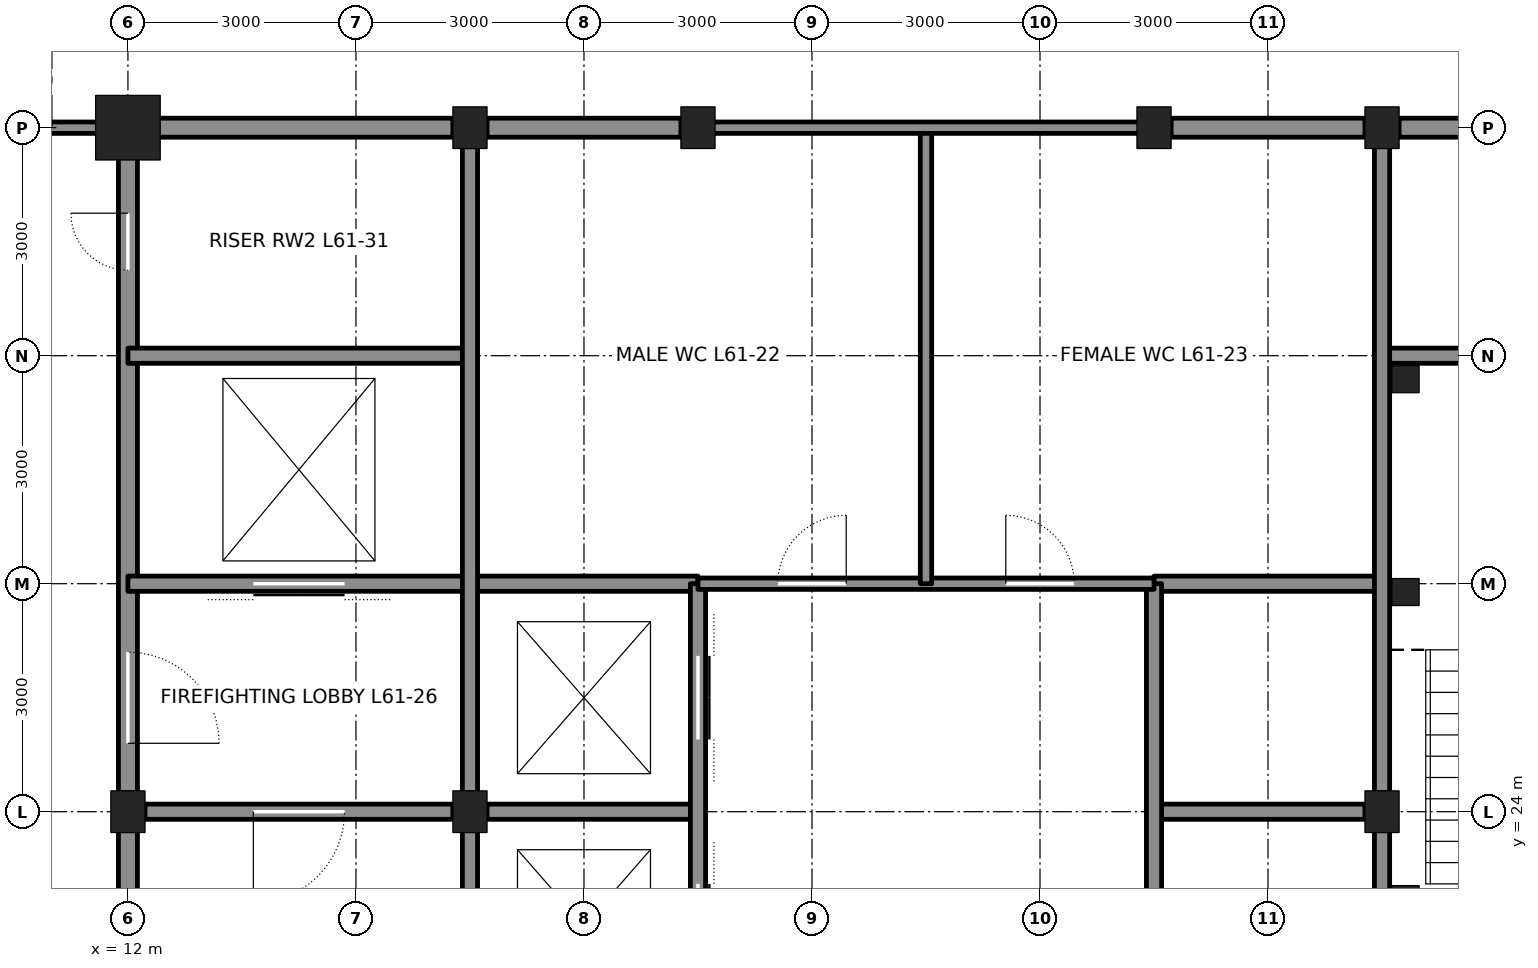
"""IFC4 building model, lengths in metres.
Left out: names, types, materials, properties, quantities, classifications, styles, units other than length and angle.
Written with IfcOpenShell. Run it as: python <this file> out.ifc"""

import sys

from ifc_helpers import new_model, si_unit, direction, frame, frame_2d, origin, origin_2d, place, context, subcontext, project, spatial, rectangle, hollow_rectangle, i_section, extrude, element, fill, save


model = new_model("IFC4")
c1 = context("Model", 3, precision=1e-05, world=origin(), true_north=direction((0.0, 1.0)))
c2 = subcontext(c1, "Body", "Model", "MODEL_VIEW")
j1 = project(units=[si_unit("LENGTHUNIT", "METRE"), si_unit("PLANEANGLEUNIT", "RADIAN")], contexts=[c1])
p1 = place(None, origin())
s1 = spatial("IfcSite", under=j1, at=p1, CompositionType="ELEMENT")
p2 = place(p1, origin())
s2 = spatial("IfcBuilding", under=s1, at=p2, CompositionType="ELEMENT")
p3 = place(p2, frame((0.0, 0.0, 274.8)))
s3 = spatial("IfcBuildingStorey", under=s2, at=p3, CompositionType="ELEMENT", Elevation=274.8)
p4 = place(p3, frame((12.0, 33.0, 0.0), z_axis=(0.0, 0.0, 1.0), x_axis=(1.0, 0.0, 0.0)))
e1 = element("IfcColumn", 1, at=p4, inside=s3, PredefinedType="COLUMN", context=c2, shape_type="SweptSolid", body=[
    extrude(hollow_rectangle(XDim=0.85, YDim=0.85, WallThickness=0.085, at=origin_2d()), origin(), (0.0, 0.0, 1.0), 4.2),
])
for number, where, z_axis, x_axis in (
    (2, (16.5, 33.0, 0.0), (0.0, 0.0, 1.0), (1.0, 0.0, 0.0)),
    (3, (19.5, 33.0, 0.0), (0.0, 0.0, 1.0), (1.0, 0.0, 0.0)),
    (4, (25.5, 33.0, 0.0), (0.0, 0.0, 1.0), (1.0, 0.0, 0.0)),
    (5, (28.5, 33.0, 0.0), (0.0, 0.0, 1.0), (1.0, 0.0, 0.0)),
    (6, (12.0, 24.0, 0.0), (0.0, 0.0, 1.0), (1.0, 0.0, 0.0)),
    (7, (16.5, 24.0, 0.0), (0.0, 0.0, 1.0), (1.0, 0.0, 0.0)),
    (8, (28.5, 24.0, 0.0), (0.0, 0.0, 1.0), (1.0, 0.0, 0.0)),
):
    element("IfcColumn", number, at=place(p3, frame(where, z_axis=z_axis, x_axis=x_axis)), inside=s3, PredefinedType="COLUMN", context=c2, shape_type="SweptSolid", body=[
        extrude(i_section(OverallWidth=0.449, OverallDepth=0.549, WebThickness=0.072, FlangeThickness=0.115, at=origin_2d()), origin(), (0.0, 0.0, 1.0), 4.2),
    ])
p5 = place(p3, frame((12.0, 21.25, 0.0), z_axis=(0.0, 0.0, 1.0), x_axis=(0.0, 1.0, 0.0)))
e9 = element("IfcWall", 9, at=p5, inside=s3, PredefinedType="SOLIDWALL", context=c2, shape_type="SweptSolid", body=[
    extrude(rectangle(XDim=2.5, YDim=0.25, at=frame_2d((1.25, 0.0))), origin(), (0.0, 0.0, 1.0), 3.113),
])
p6 = place(p3, frame((12.0, 24.25, 0.0), z_axis=(0.0, 0.0, 1.0), x_axis=(0.0, 1.0, 0.0)))
e10 = element("IfcWall", 10, at=p6, inside=s3, PredefinedType="SOLIDWALL", context=c2, shape_type="SweptSolid", body=[
    extrude(rectangle(XDim=8.5, YDim=0.25, at=frame_2d((4.25, 0.0))), origin(), (0.0, 0.0, 1.0), 3.113),
])
p7 = place(p6, frame((0.65, 0.0, 0.0)))
e11 = element("IfcOpeningElement", 11, at=p7, cuts=e10, PredefinedType="OPENING", context=c2, shape_type="SweptSolid", body=[
    extrude(rectangle(XDim=1.2, YDim=2.1, at=frame_2d((0.6, 1.05))), frame((0.0, 0.135, 0.0), z_axis=(0.0, -1.0, 0.0), x_axis=(1.0, 0.0, 0.0)), (0.0, 0.0, 1.0), 0.27),
])
p8 = place(p6, frame((6.875, 0.0, 0.0)))
e12 = element("IfcOpeningElement", 12, at=p8, cuts=e10, PredefinedType="OPENING", context=c2, shape_type="SweptSolid", body=[
    extrude(rectangle(XDim=0.75, YDim=2.1, at=frame_2d((0.375, 1.05))), frame((0.0, 0.135, 0.0), z_axis=(0.0, -1.0, 0.0), x_axis=(1.0, 0.0, 0.0)), (0.0, 0.0, 1.0), 0.27),
])
p9 = place(p3, frame((12.225, 24.0, 0.0), z_axis=(0.0, 0.0, 1.0), x_axis=(1.0, 0.0, 0.0)))
e13 = element("IfcWall", 13, at=p9, inside=s3, PredefinedType="SOLIDWALL", context=c2, shape_type="SweptSolid", body=[
    extrude(rectangle(XDim=4.05, YDim=0.2, at=frame_2d((2.025, 0.0))), origin(), (0.0, 0.0, 1.0), 3.09),
])
p10 = place(p9, frame((1.425, 0.0, 0.0)))
e14 = element("IfcOpeningElement", 14, at=p10, cuts=e13, PredefinedType="OPENING", context=c2, shape_type="SweptSolid", body=[
    extrude(rectangle(XDim=1.2, YDim=2.1, at=frame_2d((0.6, 1.05))), frame((0.0, 0.11, 0.0), z_axis=(0.0, -1.0, 0.0), x_axis=(1.0, 0.0, 0.0)), (0.0, 0.0, 1.0), 0.22),
])
for number, where, z_axis, x_axis in (
    (15, (16.725, 24.0, 0.0), (0.0, 0.0, 1.0), (1.0, 0.0, 0.0)),
    (16, (25.5, 24.0, 0.0), (0.0, 0.0, 1.0), (1.0, 0.0, 0.0)),
):
    element("IfcWall", number, at=place(p3, frame(where, z_axis=z_axis, x_axis=x_axis)), inside=s3, PredefinedType="SOLIDWALL", context=c2, shape_type="SweptSolid", body=[
        extrude(rectangle(XDim=2.775, YDim=0.2, at=frame_2d((1.388, 0.0))), origin(), (0.0, 0.0, 1.0), 3.09),
    ])
p11 = place(p3, frame((12.0, 27.0, 0.0), z_axis=(0.0, 0.0, 1.0), x_axis=(1.0, 0.0, 0.0)))
e17 = element("IfcWall", 17, at=p11, inside=s3, PredefinedType="SOLIDWALL", context=c2, shape_type="SweptSolid", body=[
    extrude(rectangle(XDim=7.5, YDim=0.2, at=frame_2d((3.75, 0.0))), origin(), (0.0, 0.0, 1.0), 4.04),
])
p12 = place(p11, frame((1.65, 0.0, 0.0)))
e18 = element("IfcOpeningElement", 18, at=p12, cuts=e17, PredefinedType="OPENING", context=c2, shape_type="SweptSolid", body=[
    extrude(rectangle(XDim=1.2, YDim=2.1, at=frame_2d((0.6, 1.05))), frame((0.0, 0.11, 0.0), z_axis=(0.0, -1.0, 0.0), x_axis=(1.0, 0.0, 0.0)), (0.0, 0.0, 1.0), 0.22),
])
p13 = place(p3, frame((25.5, 27.0, 0.0), z_axis=(0.0, 0.0, 1.0), x_axis=(1.0, 0.0, 0.0)))
e19 = element("IfcWall", 19, at=p13, inside=s3, PredefinedType="SOLIDWALL", context=c2, shape_type="SweptSolid", body=[
    extrude(rectangle(XDim=3.0, YDim=0.2, at=frame_2d((1.5, 0.0))), origin(), (0.0, 0.0, 1.0), 4.04),
])
for number, where, z_axis, x_axis in (
    (20, (12.0, 30.0, 0.0), (0.0, 0.0, 1.0), (1.0, 0.0, 0.0)),
    (21, (28.5, 30.0, 0.0), (0.0, 0.0, 1.0), (1.0, 0.0, 0.0)),
):
    element("IfcWall", number, at=place(p3, frame(where, z_axis=z_axis, x_axis=x_axis)), inside=s3, PredefinedType="SOLIDWALL", context=c2, shape_type="SweptSolid", body=[
        extrude(rectangle(XDim=4.5, YDim=0.2, at=frame_2d((2.25, 0.0))), origin(), (0.0, 0.0, 1.0), 4.04),
    ])
p14 = place(p3, frame((12.25, 33.0, 0.0), z_axis=(0.0, 0.0, 1.0), x_axis=(1.0, 0.0, 0.0)))
e22 = element("IfcWall", 22, at=p14, inside=s3, PredefinedType="SOLIDWALL", context=c2, shape_type="SweptSolid", body=[
    extrude(rectangle(XDim=4.025, YDim=0.25, at=frame_2d((2.013, 0.0))), origin(), (0.0, 0.0, 1.0), 3.181),
])
for number, where, z_axis, x_axis in (
    (23, (16.725, 33.0, 0.0), (0.0, 0.0, 1.0), (1.0, 0.0, 0.0)),
    (24, (25.725, 33.0, 0.0), (0.0, 0.0, 1.0), (1.0, 0.0, 0.0)),
):
    element("IfcWall", number, at=place(p3, frame(where, z_axis=z_axis, x_axis=x_axis)), inside=s3, PredefinedType="SOLIDWALL", context=c2, shape_type="SweptSolid", body=[
        extrude(rectangle(XDim=2.55, YDim=0.25, at=frame_2d((1.275, 0.0))), origin(), (0.0, 0.0, 1.0), 3.181),
    ])
p15 = place(p3, frame((28.725, 33.0, 0.0), z_axis=(0.0, 0.0, 1.0), x_axis=(1.0, 0.0, 0.0)))
e25 = element("IfcWall", 25, at=p15, inside=s3, PredefinedType="SOLIDWALL", context=c2, shape_type="SweptSolid", body=[
    extrude(rectangle(XDim=4.025, YDim=0.25, at=frame_2d((2.013, 0.0))), origin(), (0.0, 0.0, 1.0), 3.181),
])
p16 = place(p3, frame((16.5, 21.25, 0.0), z_axis=(0.0, 0.0, 1.0), x_axis=(0.0, 1.0, 0.0)))
e26 = element("IfcWall", 26, at=p16, inside=s3, PredefinedType="SOLIDWALL", context=c2, shape_type="SweptSolid", body=[
    extrude(rectangle(XDim=2.5, YDim=0.2, at=frame_2d((1.25, 0.0))), origin(), (0.0, 0.0, 1.0), 3.113),
])
p17 = place(p3, frame((16.5, 24.25, 0.0), z_axis=(0.0, 0.0, 1.0), x_axis=(0.0, 1.0, 0.0)))
e27 = element("IfcWall", 27, at=p17, inside=s3, PredefinedType="SOLIDWALL", context=c2, shape_type="SweptSolid", body=[
    extrude(rectangle(XDim=8.5, YDim=0.2, at=frame_2d((4.25, 0.0))), origin(), (0.0, 0.0, 1.0), 3.113),
])
p18 = place(p3, frame((19.5, 15.0, 0.0), z_axis=(0.0, 0.0, 1.0), x_axis=(0.0, 1.0, 0.0)))
e28 = element("IfcWall", 28, at=p18, inside=s3, PredefinedType="SOLIDWALL", context=c2, shape_type="SweptSolid", body=[
    extrude(rectangle(XDim=12.0, YDim=0.2, at=frame_2d((6.0, 0.0))), origin(), (0.0, 0.0, 1.0), 3.064),
])
p19 = place(p18, frame((0.95, 0.0, 0.0)))
e29 = element("IfcOpeningElement", 29, at=p19, cuts=e28, PredefinedType="OPENING", context=c2, shape_type="SweptSolid", body=[
    extrude(rectangle(XDim=1.1, YDim=2.1, at=frame_2d((0.55, 1.05))), frame((0.0, 0.11, 0.0), z_axis=(0.0, -1.0, 0.0), x_axis=(1.0, 0.0, 0.0)), (0.0, 0.0, 1.0), 0.22),
])
p20 = place(p18, frame((3.95, 0.0, 0.0)))
e30 = element("IfcOpeningElement", 30, at=p20, cuts=e28, PredefinedType="OPENING", context=c2, shape_type="SweptSolid", body=[
    extrude(rectangle(XDim=1.1, YDim=2.1, at=frame_2d((0.55, 1.05))), frame((0.0, 0.11, 0.0), z_axis=(0.0, -1.0, 0.0), x_axis=(1.0, 0.0, 0.0)), (0.0, 0.0, 1.0), 0.22),
])
p21 = place(p18, frame((6.95, 0.0, 0.0)))
e31 = element("IfcOpeningElement", 31, at=p21, cuts=e28, PredefinedType="OPENING", context=c2, shape_type="SweptSolid", body=[
    extrude(rectangle(XDim=1.1, YDim=2.1, at=frame_2d((0.55, 1.05))), frame((0.0, 0.11, 0.0), z_axis=(0.0, -1.0, 0.0), x_axis=(1.0, 0.0, 0.0)), (0.0, 0.0, 1.0), 0.22),
])
p22 = place(p18, frame((9.95, 0.0, 0.0)))
e32 = element("IfcOpeningElement", 32, at=p22, cuts=e28, PredefinedType="OPENING", context=c2, shape_type="SweptSolid", body=[
    extrude(rectangle(XDim=1.1, YDim=2.1, at=frame_2d((0.55, 1.05))), frame((0.0, 0.11, 0.0), z_axis=(0.0, -1.0, 0.0), x_axis=(1.0, 0.0, 0.0)), (0.0, 0.0, 1.0), 0.22),
])
p23 = place(p3, frame((25.5, 15.0, 0.0), z_axis=(0.0, 0.0, 1.0), x_axis=(0.0, 1.0, 0.0)))
e33 = element("IfcWall", 33, at=p23, inside=s3, PredefinedType="SOLIDWALL", context=c2, shape_type="SweptSolid", body=[
    extrude(rectangle(XDim=12.0, YDim=0.2, at=frame_2d((6.0, 0.0))), origin(), (0.0, 0.0, 1.0), 3.064),
])
p24 = place(p23, frame((1.8, 0.0, 0.0)))
e34 = element("IfcOpeningElement", 34, at=p24, cuts=e33, PredefinedType="OPENING", context=c2, shape_type="SweptSolid", body=[
    extrude(rectangle(XDim=0.9, YDim=2.1, at=frame_2d((0.45, 1.05))), frame((0.0, 0.11, 0.0), z_axis=(0.0, -1.0, 0.0), x_axis=(1.0, 0.0, 0.0)), (0.0, 0.0, 1.0), 0.22),
])
p25 = place(p23, frame((4.8, 0.0, 0.0)))
e35 = element("IfcOpeningElement", 35, at=p25, cuts=e33, PredefinedType="OPENING", context=c2, shape_type="SweptSolid", body=[
    extrude(rectangle(XDim=0.9, YDim=2.1, at=frame_2d((0.45, 1.05))), frame((0.0, 0.11, 0.0), z_axis=(0.0, -1.0, 0.0), x_axis=(1.0, 0.0, 0.0)), (0.0, 0.0, 1.0), 0.22),
])
p26 = place(p3, frame((28.5, 21.25, 0.0), z_axis=(0.0, 0.0, 1.0), x_axis=(0.0, 1.0, 0.0)))
e36 = element("IfcWall", 36, at=p26, inside=s3, PredefinedType="SOLIDWALL", context=c2, shape_type="SweptSolid", body=[
    extrude(rectangle(XDim=2.5, YDim=0.2, at=frame_2d((1.25, 0.0))), origin(), (0.0, 0.0, 1.0), 3.113),
])
p27 = place(p3, frame((28.5, 24.25, 0.0), z_axis=(0.0, 0.0, 1.0), x_axis=(0.0, 1.0, 0.0)))
e37 = element("IfcWall", 37, at=p27, inside=s3, PredefinedType="SOLIDWALL", context=c2, shape_type="SweptSolid", body=[
    extrude(rectangle(XDim=8.5, YDim=0.2, at=frame_2d((4.25, 0.0))), origin(), (0.0, 0.0, 1.0), 3.113),
])
p28 = place(p3, frame((19.5, 27.0, 0.0), z_axis=(0.0, 0.0, 1.0), x_axis=(1.0, 0.0, 0.0)))
e38 = element("IfcWall", 38, at=p28, inside=s3, PredefinedType="PARTITIONING", context=c2, shape_type="SweptSolid", body=[
    extrude(rectangle(XDim=6.0, YDim=0.15, at=frame_2d((3.0, 0.0))), origin(), (0.0, 0.0, 1.0), 4.04),
])
p29 = place(p28, frame((1.05, 0.0, 0.0)))
e39 = element("IfcOpeningElement", 39, at=p29, cuts=e38, PredefinedType="OPENING", context=c2, shape_type="SweptSolid", body=[
    extrude(rectangle(XDim=0.9, YDim=2.1, at=frame_2d((0.45, 1.05))), frame((0.0, 0.085, 0.0), z_axis=(0.0, -1.0, 0.0), x_axis=(1.0, 0.0, 0.0)), (0.0, 0.0, 1.0), 0.17),
])
p30 = place(p28, frame((4.05, 0.0, 0.0)))
e40 = element("IfcOpeningElement", 40, at=p30, cuts=e38, PredefinedType="OPENING", context=c2, shape_type="SweptSolid", body=[
    extrude(rectangle(XDim=0.9, YDim=2.1, at=frame_2d((0.45, 1.05))), frame((0.0, 0.085, 0.0), z_axis=(0.0, -1.0, 0.0), x_axis=(1.0, 0.0, 0.0)), (0.0, 0.0, 1.0), 0.17),
])
p31 = place(p3, frame((22.5, 27.0, 0.0), z_axis=(0.0, 0.0, 1.0), x_axis=(0.0, 1.0, 0.0)))
e41 = element("IfcWall", 41, at=p31, inside=s3, PredefinedType="PARTITIONING", context=c2, shape_type="SweptSolid", body=[
    extrude(rectangle(XDim=6.0, YDim=0.15, at=frame_2d((3.0, 0.0))), origin(), (0.0, 0.0, 1.0), 4.04),
])
p32 = place(p3, frame((19.5, 33.0, 0.0), z_axis=(0.0, 0.0, 1.0), x_axis=(1.0, 0.0, 0.0)))
e42 = element("IfcWall", 42, at=p32, inside=s3, PredefinedType="PARTITIONING", context=c2, shape_type="SweptSolid", body=[
    extrude(rectangle(XDim=6.0, YDim=0.15, at=frame_2d((3.0, 0.0))), origin(), (0.0, 0.0, 1.0), 3.181),
])
p33 = place(p3, frame((9.0, 33.0, 0.0), z_axis=(0.0, 0.0, 1.0), x_axis=(1.0, 0.0, 0.0)))
e43 = element("IfcWall", 43, at=p33, inside=s3, PredefinedType="PARTITIONING", context=c2, shape_type="SweptSolid", body=[
    extrude(rectangle(XDim=3.0, YDim=0.15, at=frame_2d((1.5, 0.0))), origin(), (0.0, 0.0, 1.0), 3.27),
])
p34 = place(p33, frame((1.0, 0.0, 0.0)))
e44 = element("IfcOpeningElement", 44, at=p34, cuts=e43, PredefinedType="OPENING", context=c2, shape_type="SweptSolid", body=[
    extrude(rectangle(XDim=1.0, YDim=2.4, at=frame_2d((0.5, 1.2))), frame((0.0, 0.085, 0.0), z_axis=(0.0, -1.0, 0.0), x_axis=(1.0, 0.0, 0.0)), (0.0, 0.0, 1.0), 0.17),
])
for number, where, z_axis, x_axis in (
    (45, (28.81, 29.69, 0.0), (0.0, 0.0, 1.0), (1.0, 0.0, 0.0)),
    (46, (28.81, 26.89, 0.0), (0.0, 0.0, 1.0), (1.0, 0.0, 0.0)),
    (47, (28.81, 22.85, 0.0), (0.0, 0.0, 1.0), (1.0, 0.0, 0.0)),
):
    element("IfcColumn", number, at=place(p3, frame(where, z_axis=z_axis, x_axis=x_axis)), inside=s3, PredefinedType="COLUMN", context=c2, shape_type="SweptSolid", body=[
        extrude(hollow_rectangle(XDim=0.356, YDim=0.356, WallThickness=0.009, at=origin_2d()), origin(), (0.0, 0.0, 1.0), 4.2),
    ])
p35 = place(p10, frame((1.2, 0.0, 0.0), z_axis=(0.0, 0.0, 1.0), x_axis=(-1.0, 0.0, 0.0)))
e48 = element("IfcDoor", 48, at=p35, inside=s3, OperationType="SINGLE_SWING_RIGHT", PredefinedType="DOOR", context=c2, shape_type="SweptSolid", body=[
    extrude(rectangle(XDim=1.2, YDim=2.1, at=frame_2d((0.6, 1.05))), frame((0.0, 0.025, 0.0), z_axis=(0.0, -1.0, 0.0), x_axis=(1.0, 0.0, 0.0)), (0.0, 0.0, 1.0), 0.05),
])
fill(e14, e48)
p36 = place(p7, frame((1.2, 0.0, 0.0), z_axis=(0.0, 0.0, 1.0), x_axis=(-1.0, 0.0, 0.0)))
e49 = element("IfcDoor", 49, at=p36, inside=s3, OperationType="SINGLE_SWING_RIGHT", PredefinedType="DOOR", context=c2, shape_type="SweptSolid", body=[
    extrude(rectangle(XDim=1.2, YDim=2.1, at=frame_2d((0.6, 1.05))), frame((0.0, 0.025, 0.0), z_axis=(0.0, -1.0, 0.0), x_axis=(1.0, 0.0, 0.0)), (0.0, 0.0, 1.0), 0.05),
])
fill(e11, e49)
p37 = place(p12, origin())
e50 = element("IfcDoor", 50, at=p37, inside=s3, OperationType="DOUBLE_DOOR_SLIDING", PredefinedType="DOOR", context=c2, shape_type="SweptSolid", body=[
    extrude(rectangle(XDim=1.2, YDim=2.1, at=frame_2d((0.6, 1.05))), frame((0.0, 0.025, 0.0), z_axis=(0.0, -1.0, 0.0), x_axis=(1.0, 0.0, 0.0)), (0.0, 0.0, 1.0), 0.05),
])
fill(e18, e50)
p38 = place(p8, origin())
e51 = element("IfcDoor", 51, at=p38, inside=s3, OperationType="SINGLE_SWING_RIGHT", PredefinedType="DOOR", context=c2, shape_type="SweptSolid", body=[
    extrude(rectangle(XDim=0.75, YDim=2.1, at=frame_2d((0.375, 1.05))), frame((0.0, 0.025, 0.0), z_axis=(0.0, -1.0, 0.0), x_axis=(1.0, 0.0, 0.0)), (0.0, 0.0, 1.0), 0.05),
])
fill(e12, e51)
p39 = place(p29, origin())
e52 = element("IfcDoor", 52, at=p39, inside=s3, OperationType="SINGLE_SWING_RIGHT", PredefinedType="DOOR", context=c2, shape_type="SweptSolid", body=[
    extrude(rectangle(XDim=0.9, YDim=2.1, at=frame_2d((0.45, 1.05))), frame((0.0, 0.025, 0.0), z_axis=(0.0, -1.0, 0.0), x_axis=(1.0, 0.0, 0.0)), (0.0, 0.0, 1.0), 0.05),
])
fill(e39, e52)
p40 = place(p30, origin())
e53 = element("IfcDoor", 53, at=p40, inside=s3, OperationType="SINGLE_SWING_LEFT", PredefinedType="DOOR", context=c2, shape_type="SweptSolid", body=[
    extrude(rectangle(XDim=0.9, YDim=2.1, at=frame_2d((0.45, 1.05))), frame((0.0, 0.025, 0.0), z_axis=(0.0, -1.0, 0.0), x_axis=(1.0, 0.0, 0.0)), (0.0, 0.0, 1.0), 0.05),
])
fill(e40, e53)
p41 = place(p21, origin())
e54 = element("IfcDoor", 54, at=p41, inside=s3, OperationType="DOUBLE_DOOR_SLIDING", PredefinedType="DOOR", context=c2, shape_type="SweptSolid", body=[
    extrude(rectangle(XDim=1.1, YDim=2.1, at=frame_2d((0.55, 1.05))), frame((0.0, 0.025, 0.0), z_axis=(0.0, -1.0, 0.0), x_axis=(1.0, 0.0, 0.0)), (0.0, 0.0, 1.0), 0.05),
])
fill(e31, e54)
p42 = place(p22, origin())
e55 = element("IfcDoor", 55, at=p42, inside=s3, OperationType="DOUBLE_DOOR_SLIDING", PredefinedType="DOOR", context=c2, shape_type="SweptSolid", body=[
    extrude(rectangle(XDim=1.1, YDim=2.1, at=frame_2d((0.55, 1.05))), frame((0.0, 0.025, 0.0), z_axis=(0.0, -1.0, 0.0), x_axis=(1.0, 0.0, 0.0)), (0.0, 0.0, 1.0), 0.05),
])
fill(e32, e55)
save(model, sys.argv[1])
